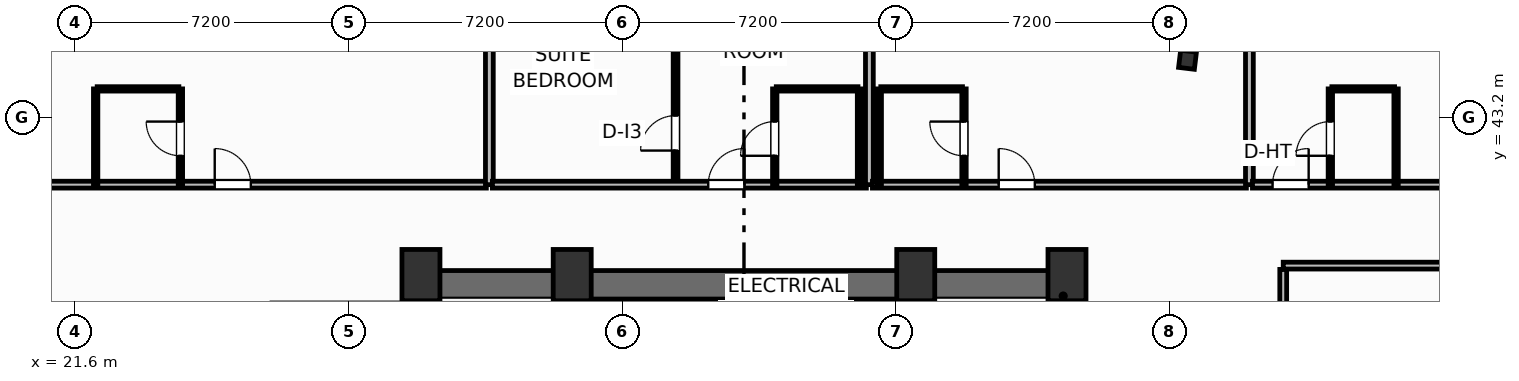
"""IFC4 building model, lengths in metres.
Left out: names, types, materials, properties, quantities, classifications, styles, units other than length and angle.
Written with IfcOpenShell. Run it as: python <this file> out.ifc"""

import sys

from ifc_helpers import new_model, si_unit, direction, frame, frame_2d, origin, origin_2d, place, context, subcontext, project, spatial, rectangle, i_section, extrude, element, fill, save


model = new_model("IFC4")
c1 = context("Model", 3, precision=1e-05, world=origin(), true_north=direction((0.0, 1.0)))
c2 = subcontext(c1, "Body", "Model", "MODEL_VIEW")
j1 = project(units=[si_unit("LENGTHUNIT", "METRE"), si_unit("PLANEANGLEUNIT", "RADIAN")], contexts=[c1])
p1 = place(None, origin())
s1 = spatial("IfcSite", under=j1, at=p1, CompositionType="ELEMENT")
p2 = place(p1, origin())
s2 = spatial("IfcBuilding", under=s1, at=p2, CompositionType="ELEMENT")
p3 = place(p2, frame((0.0, 0.0, 125.4)))
s3 = spatial("IfcBuildingStorey", under=s2, at=p3, CompositionType="ELEMENT", Elevation=125.4)
for number, where, z_axis, x_axis in (
    (1, (30.7, 39.05, 0.0), (0.0, 0.0, 1.0), (1.0, 0.0, 0.0)),
    (2, (34.68, 39.05, 0.0), (0.0, 0.0, 1.0), (1.0, 0.0, 0.0)),
    (3, (43.72, 39.05, 0.0), (0.0, 0.0, 1.0), (1.0, 0.0, 0.0)),
    (4, (47.7, 39.05, 0.0), (0.0, 0.0, 1.0), (1.0, 0.0, 0.0)),
):
    element("IfcColumn", number, at=place(p3, frame(where, z_axis=z_axis, x_axis=x_axis)), inside=s3, PredefinedType="COLUMN", context=c2, shape_type="SweptSolid", body=[
        extrude(rectangle(XDim=1.0, YDim=1.35, at=origin_2d()), origin(), (0.0, 0.0, 1.0), 3.7),
    ])
p4 = place(p3, frame((30.38, 38.795, 0.0), z_axis=(0.0, 0.0, 1.0), x_axis=(1.0, 0.0, 0.0)))
e5 = element("IfcWall", 5, at=p4, inside=s3, PredefinedType="SHEAR", context=c2, shape_type="SweptSolid", body=[
    extrude(rectangle(XDim=17.64, YDim=0.75, at=frame_2d((8.82, 0.0))), origin(), (0.0, 0.0, 1.0), 3.45),
])
for number, where, z_axis, x_axis in (
    (6, (30.755, 29.2, 0.0), (0.0, 0.0, 1.0), (0.0, 1.0, 0.0)),
    (7, (47.645, 29.2, 0.0), (0.0, 0.0, 1.0), (0.0, 1.0, 0.0)),
):
    element("IfcWall", number, at=place(p3, frame(where, z_axis=z_axis, x_axis=x_axis)), inside=s3, PredefinedType="SHEAR", context=c2, shape_type="SweptSolid", body=[
        extrude(rectangle(XDim=9.22, YDim=0.75, at=frame_2d((4.61, 0.0))), origin(), (0.0, 0.0, 1.0), 3.45),
    ])
p5 = place(p3, frame((34.64, 29.2, 0.0), z_axis=(0.0, 0.0, 1.0), x_axis=(0.0, 1.0, 0.0)))
e8 = element("IfcWall", 8, at=p5, inside=s3, PredefinedType="SHEAR", context=c2, shape_type="SweptSolid", body=[
    extrude(rectangle(XDim=9.22, YDim=0.25, at=frame_2d((4.61, 0.0))), origin(), (0.0, 0.0, 1.0), 3.45),
])
p6 = place(p5, frame((0.65, 0.0, 0.0)))
e9 = element("IfcOpeningElement", 9, at=p6, cuts=e8, PredefinedType="OPENING", context=c2, shape_type="SweptSolid", body=[
    extrude(rectangle(XDim=1.05, YDim=2.15, at=frame_2d((0.525, 1.075))), frame((0.0, 0.135, 0.0), z_axis=(0.0, -1.0, 0.0), x_axis=(1.0, 0.0, 0.0)), (0.0, 0.0, 1.0), 0.27),
])
p7 = place(p3, frame((43.76, 29.2, 0.0), z_axis=(0.0, 0.0, 1.0), x_axis=(0.0, 1.0, 0.0)))
e10 = element("IfcWall", 10, at=p7, inside=s3, PredefinedType="SHEAR", context=c2, shape_type="SweptSolid", body=[
    extrude(rectangle(XDim=9.22, YDim=0.25, at=frame_2d((4.61, 0.0))), origin(), (0.0, 0.0, 1.0), 3.45),
])
p8 = place(p7, frame((0.65, 0.0, 0.0)))
e11 = element("IfcOpeningElement", 11, at=p8, cuts=e10, PredefinedType="OPENING", context=c2, shape_type="SweptSolid", body=[
    extrude(rectangle(XDim=1.05, YDim=2.15, at=frame_2d((0.525, 1.075))), frame((0.0, 0.135, 0.0), z_axis=(0.0, -1.0, 0.0), x_axis=(1.0, 0.0, 0.0)), (0.0, 0.0, 1.0), 0.27),
])
p9 = place(p3, frame((50.872, 44.717, 0.0), z_axis=(0.0, 0.0, 1.0), x_axis=(0.992732158755, -0.12034475881, 0.0)))
e12 = element("IfcColumn", 12, at=p9, inside=s3, PredefinedType="COLUMN", context=c2, shape_type="SweptSolid", body=[
    extrude(i_section(OverallWidth=0.418, OverallDepth=0.455, WebThickness=0.042, FlangeThickness=0.068, FilletRadius=0.025, at=origin_2d()), origin(), (0.0, 0.0, 1.0), 3.7),
])
p10 = place(p3, frame((73.538, 44.588, 0.0), z_axis=(0.0, 0.0, 1.0), x_axis=(-0.992733493583, 0.120333747213, 0.0)))
e13 = element("IfcWall", 13, at=p10, inside=s3, PredefinedType="SOLIDWALL", context=c2, shape_type="SweptSolid", body=[
    extrude(rectangle(XDim=21.447, YDim=0.22, at=frame_2d((10.724, 0.0))), origin(), (0.0, 0.0, 1.0), 2.73),
])
p11 = place(p10, frame((9.899, 0.0, 0.8)))
e14 = element("IfcOpeningElement", 14, at=p11, cuts=e13, PredefinedType="OPENING", context=c2, shape_type="SweptSolid", body=[
    extrude(rectangle(XDim=1.65, YDim=1.65, at=frame_2d((0.825, 0.825))), frame((0.0, 0.12, 0.0), z_axis=(0.0, -1.0, 0.0), x_axis=(1.0, 0.0, 0.0)), (0.0, 0.0, 1.0), 0.24),
])
p12 = place(p3, frame((3.864, 41.43, 0.0), z_axis=(0.0, 0.0, 1.0), x_axis=(1.0, 0.0, 0.0)))
e15 = element("IfcWall", 15, at=p12, inside=s3, PredefinedType="PARTITIONING", context=c2, shape_type="SweptSolid", body=[
    extrude(rectangle(XDim=28.556, YDim=0.18, at=frame_2d((14.278, 0.0))), origin(), (0.0, 0.0, 1.0), 3.45),
])
p13 = place(p12, frame((21.409, 0.0, 0.0)))
e16 = element("IfcOpeningElement", 16, at=p13, cuts=e15, PredefinedType="OPENING", context=c2, shape_type="SweptSolid", body=[
    extrude(rectangle(XDim=0.95, YDim=2.15, at=frame_2d((0.475, 1.075))), frame((0.0, 0.1, 0.0), z_axis=(0.0, -1.0, 0.0), x_axis=(1.0, 0.0, 0.0)), (0.0, 0.0, 1.0), 0.2),
])
p14 = place(p3, frame((22.18, 43.95, 0.0), z_axis=(0.0, 0.0, 1.0), x_axis=(1.0, 0.0, 0.0)))
e17 = element("IfcWall", 17, at=p14, inside=s3, PredefinedType="PARTITIONING", context=c2, shape_type="SweptSolid", body=[
    extrude(rectangle(XDim=2.15, YDim=0.115, at=frame_2d((1.075, 0.0))), origin(), (0.0, 0.0, 1.0), 3.45),
])
p15 = place(p3, frame((24.37, 41.43, 0.0), z_axis=(0.0, 0.0, 1.0), x_axis=(0.0, 1.0, 0.0)))
e18 = element("IfcWall", 18, at=p15, inside=s3, PredefinedType="PARTITIONING", context=c2, shape_type="SweptSolid", body=[
    extrude(rectangle(XDim=2.52, YDim=0.115, at=frame_2d((1.26, 0.0))), origin(), (0.0, 0.0, 1.0), 3.45),
])
p16 = place(p15, frame((0.76, 0.0, 0.0)))
e19 = element("IfcOpeningElement", 19, at=p16, cuts=e18, PredefinedType="OPENING", context=c2, shape_type="SweptSolid", body=[
    extrude(rectangle(XDim=0.9, YDim=2.05, at=frame_2d((0.45, 1.025))), frame((0.0, 0.067, 0.0), z_axis=(0.0, -1.0, 0.0), x_axis=(1.0, 0.0, 0.0)), (0.0, 0.0, 1.0), 0.135),
])
p17 = place(p3, frame((22.14, 41.43, 0.0), z_axis=(0.0, 0.0, 1.0), x_axis=(0.0, 1.0, 0.0)))
e20 = element("IfcWall", 20, at=p17, inside=s3, PredefinedType="PARTITIONING", context=c2, shape_type="SweptSolid", body=[
    extrude(rectangle(XDim=2.52, YDim=0.115, at=frame_2d((1.26, 0.0))), origin(), (0.0, 0.0, 1.0), 3.45),
])
p18 = place(p3, frame((32.5, 41.43, 0.0), z_axis=(0.0, 0.0, 1.0), x_axis=(0.0, 1.0, 0.0)))
e21 = element("IfcWall", 21, at=p18, inside=s3, PredefinedType="PARTITIONING", context=c2, shape_type="SweptSolid", body=[
    extrude(rectangle(XDim=5.997, YDim=0.205, at=frame_2d((2.999, 0.0))), origin(), (0.0, 0.0, 1.0), 2.662),
])
p19 = place(p3, frame((37.4, 41.43, 0.0), z_axis=(0.0, 0.0, 1.0), x_axis=(0.0, 1.0, 0.0)))
e22 = element("IfcWall", 22, at=p19, inside=s3, PredefinedType="PARTITIONING", context=c2, shape_type="SweptSolid", body=[
    extrude(rectangle(XDim=5.403, YDim=0.125, at=frame_2d((2.702, 0.0))), origin(), (0.0, 0.0, 1.0), 3.45),
])
p20 = place(p19, frame((0.897, 0.0, 0.0)))
e23 = element("IfcOpeningElement", 23, at=p20, cuts=e22, PredefinedType="OPENING", context=c2, shape_type="SweptSolid", body=[
    extrude(rectangle(XDim=0.92, YDim=2.05, at=frame_2d((0.46, 1.025))), frame((0.0, 0.073, 0.0), z_axis=(0.0, -1.0, 0.0), x_axis=(1.0, 0.0, 0.0)), (0.0, 0.0, 1.0), 0.145),
])
p21 = place(p3, frame((32.58, 41.43, 0.0), z_axis=(0.0, 0.0, 1.0), x_axis=(1.0, 0.0, 0.0)))
e24 = element("IfcWall", 24, at=p21, inside=s3, PredefinedType="PARTITIONING", context=c2, shape_type="SweptSolid", body=[
    extrude(rectangle(XDim=9.84, YDim=0.18, at=frame_2d((4.92, 0.0))), origin(), (0.0, 0.0, 1.0), 3.45),
])
p22 = place(p21, frame((5.68, 0.0, 0.0)))
e25 = element("IfcOpeningElement", 25, at=p22, cuts=e24, PredefinedType="OPENING", context=c2, shape_type="SweptSolid", body=[
    extrude(rectangle(XDim=0.95, YDim=2.15, at=frame_2d((0.475, 1.075))), frame((0.0, 0.1, 0.0), z_axis=(0.0, -1.0, 0.0), x_axis=(1.0, 0.0, 0.0)), (0.0, 0.0, 1.0), 0.2),
])
p23 = place(p3, frame((40.05, 43.95, 0.0), z_axis=(0.0, 0.0, 1.0), x_axis=(1.0, 0.0, 0.0)))
e26 = element("IfcWall", 26, at=p23, inside=s3, PredefinedType="PARTITIONING", context=c2, shape_type="SweptSolid", body=[
    extrude(rectangle(XDim=2.15, YDim=0.115, at=frame_2d((1.075, 0.0))), origin(), (0.0, 0.0, 1.0), 3.45),
])
p24 = place(p3, frame((40.01, 41.43, 0.0), z_axis=(0.0, 0.0, 1.0), x_axis=(0.0, 1.0, 0.0)))
e27 = element("IfcWall", 27, at=p24, inside=s3, PredefinedType="PARTITIONING", context=c2, shape_type="SweptSolid", body=[
    extrude(rectangle(XDim=2.52, YDim=0.115, at=frame_2d((1.26, 0.0))), origin(), (0.0, 0.0, 1.0), 3.45),
])
p25 = place(p24, frame((0.76, 0.0, 0.0)))
e28 = element("IfcOpeningElement", 28, at=p25, cuts=e27, PredefinedType="OPENING", context=c2, shape_type="SweptSolid", body=[
    extrude(rectangle(XDim=0.9, YDim=2.05, at=frame_2d((0.45, 1.025))), frame((0.0, 0.067, 0.0), z_axis=(0.0, -1.0, 0.0), x_axis=(1.0, 0.0, 0.0)), (0.0, 0.0, 1.0), 0.135),
])
p26 = place(p3, frame((42.24, 41.43, 0.0), z_axis=(0.0, 0.0, 1.0), x_axis=(0.0, 1.0, 0.0)))
e29 = element("IfcWall", 29, at=p26, inside=s3, PredefinedType="PARTITIONING", context=c2, shape_type="SweptSolid", body=[
    extrude(rectangle(XDim=2.52, YDim=0.115, at=frame_2d((1.26, 0.0))), origin(), (0.0, 0.0, 1.0), 2.662),
])
p27 = place(p3, frame((42.5, 41.43, 0.0), z_axis=(0.0, 0.0, 1.0), x_axis=(0.0, 1.0, 0.0)))
e30 = element("IfcWall", 30, at=p27, inside=s3, PredefinedType="PARTITIONING", context=c2, shape_type="SweptSolid", body=[
    extrude(rectangle(XDim=6.9, YDim=0.205, at=frame_2d((3.45, 0.0))), origin(), (0.0, 0.0, 1.0), 2.662),
])
p28 = place(p3, frame((42.58, 41.43, 0.0), z_axis=(0.0, 0.0, 1.0), x_axis=(1.0, 0.0, 0.0)))
e31 = element("IfcWall", 31, at=p28, inside=s3, PredefinedType="PARTITIONING", context=c2, shape_type="SweptSolid", body=[
    extrude(rectangle(XDim=9.84, YDim=0.18, at=frame_2d((4.92, 0.0))), origin(), (0.0, 0.0, 1.0), 3.45),
])
p29 = place(p28, frame((3.323, 0.0, 0.0)))
e32 = element("IfcOpeningElement", 32, at=p29, cuts=e31, PredefinedType="OPENING", context=c2, shape_type="SweptSolid", body=[
    extrude(rectangle(XDim=0.95, YDim=2.15, at=frame_2d((0.475, 1.075))), frame((0.0, 0.1, 0.0), z_axis=(0.0, -1.0, 0.0), x_axis=(1.0, 0.0, 0.0)), (0.0, 0.0, 1.0), 0.2),
])
p30 = place(p3, frame((42.8, 43.95, 0.0), z_axis=(0.0, 0.0, 1.0), x_axis=(1.0, 0.0, 0.0)))
e33 = element("IfcWall", 33, at=p30, inside=s3, PredefinedType="PARTITIONING", context=c2, shape_type="SweptSolid", body=[
    extrude(rectangle(XDim=2.15, YDim=0.115, at=frame_2d((1.075, 0.0))), origin(), (0.0, 0.0, 1.0), 3.45),
])
p31 = place(p3, frame((44.99, 41.43, 0.0), z_axis=(0.0, 0.0, 1.0), x_axis=(0.0, 1.0, 0.0)))
e34 = element("IfcWall", 34, at=p31, inside=s3, PredefinedType="PARTITIONING", context=c2, shape_type="SweptSolid", body=[
    extrude(rectangle(XDim=2.52, YDim=0.115, at=frame_2d((1.26, 0.0))), origin(), (0.0, 0.0, 1.0), 3.45),
])
p32 = place(p31, frame((0.76, 0.0, 0.0)))
e35 = element("IfcOpeningElement", 35, at=p32, cuts=e34, PredefinedType="OPENING", context=c2, shape_type="SweptSolid", body=[
    extrude(rectangle(XDim=0.9, YDim=2.05, at=frame_2d((0.45, 1.025))), frame((0.0, 0.067, 0.0), z_axis=(0.0, -1.0, 0.0), x_axis=(1.0, 0.0, 0.0)), (0.0, 0.0, 1.0), 0.135),
])
p33 = place(p3, frame((42.76, 41.43, 0.0), z_axis=(0.0, 0.0, 1.0), x_axis=(0.0, 1.0, 0.0)))
e36 = element("IfcWall", 36, at=p33, inside=s3, PredefinedType="PARTITIONING", context=c2, shape_type="SweptSolid", body=[
    extrude(rectangle(XDim=2.52, YDim=0.115, at=frame_2d((1.26, 0.0))), origin(), (0.0, 0.0, 1.0), 2.662),
])
p34 = place(p3, frame((52.5, 41.43, 0.0), z_axis=(0.0, 0.0, 1.0), x_axis=(0.0, 1.0, 0.0)))
e37 = element("IfcWall", 37, at=p34, inside=s3, PredefinedType="PARTITIONING", context=c2, shape_type="SweptSolid", body=[
    extrude(rectangle(XDim=5.688, YDim=0.205, at=frame_2d((2.844, 0.0))), origin(), (0.0, 0.0, 1.0), 3.45),
])
p35 = place(p3, frame((52.58, 41.43, 0.0), z_axis=(0.0, 0.0, 1.0), x_axis=(1.0, 0.0, 0.0)))
e38 = element("IfcWall", 38, at=p35, inside=s3, PredefinedType="PARTITIONING", context=c2, shape_type="SweptSolid", body=[
    extrude(rectangle(XDim=21.74, YDim=0.18, at=frame_2d((10.87, 0.0))), origin(), (0.0, 0.0, 1.0), 3.45),
])
p36 = place(p35, frame((0.529, 0.0, 0.0)))
e39 = element("IfcOpeningElement", 39, at=p36, cuts=e38, PredefinedType="OPENING", context=c2, shape_type="SweptSolid", body=[
    extrude(rectangle(XDim=0.95, YDim=2.15, at=frame_2d((0.475, 1.075))), frame((0.0, 0.1, 0.0), z_axis=(0.0, -1.0, 0.0), x_axis=(1.0, 0.0, 0.0)), (0.0, 0.0, 1.0), 0.2),
])
p37 = place(p3, frame((54.67, 43.95, 0.0), z_axis=(0.0, 0.0, 1.0), x_axis=(1.0, 0.0, 0.0)))
e40 = element("IfcWall", 40, at=p37, inside=s3, PredefinedType="PARTITIONING", context=c2, shape_type="SweptSolid", body=[
    extrude(rectangle(XDim=1.65, YDim=0.115, at=frame_2d((0.825, 0.0))), origin(), (0.0, 0.0, 1.0), 2.824),
])
p38 = place(p3, frame((54.63, 41.43, 0.0), z_axis=(0.0, 0.0, 1.0), x_axis=(0.0, 1.0, 0.0)))
e41 = element("IfcWall", 41, at=p38, inside=s3, PredefinedType="PARTITIONING", context=c2, shape_type="SweptSolid", body=[
    extrude(rectangle(XDim=2.52, YDim=0.115, at=frame_2d((1.26, 0.0))), origin(), (0.0, 0.0, 1.0), 3.45),
])
p39 = place(p38, frame((0.76, 0.0, 0.0)))
e42 = element("IfcOpeningElement", 42, at=p39, cuts=e41, PredefinedType="OPENING", context=c2, shape_type="SweptSolid", body=[
    extrude(rectangle(XDim=0.9, YDim=2.05, at=frame_2d((0.45, 1.025))), frame((0.0, 0.067, 0.0), z_axis=(0.0, -1.0, 0.0), x_axis=(1.0, 0.0, 0.0)), (0.0, 0.0, 1.0), 0.135),
])
p40 = place(p3, frame((56.36, 41.43, 0.0), z_axis=(0.0, 0.0, 1.0), x_axis=(0.0, 1.0, 0.0)))
e43 = element("IfcWall", 43, at=p40, inside=s3, PredefinedType="PARTITIONING", context=c2, shape_type="SweptSolid", body=[
    extrude(rectangle(XDim=2.52, YDim=0.115, at=frame_2d((1.26, 0.0))), origin(), (0.0, 0.0, 1.0), 3.45),
])
p41 = place(p3, frame((53.39, 27.53, 0.0), z_axis=(0.0, 0.0, 1.0), x_axis=(0.0, 1.0, 0.0)))
e44 = element("IfcWall", 44, at=p41, inside=s3, PredefinedType="PARTITIONING", context=c2, shape_type="SweptSolid", body=[
    extrude(rectangle(XDim=11.67, YDim=0.18, at=frame_2d((5.835, 0.0))), origin(), (0.0, 0.0, 1.0), 3.45),
])
p42 = place(p41, frame((5.8, 0.0, 0.0)))
e45 = element("IfcOpeningElement", 45, at=p42, cuts=e44, PredefinedType="OPENING", context=c2, shape_type="SweptSolid", body=[
    extrude(rectangle(XDim=0.92, YDim=2.05, at=frame_2d((0.46, 1.025))), frame((0.0, 0.1, 0.0), z_axis=(0.0, -1.0, 0.0), x_axis=(1.0, 0.0, 0.0)), (0.0, 0.0, 1.0), 0.2),
])
p43 = place(p3, frame((53.39, 39.3, 0.0), z_axis=(0.0, 0.0, 1.0), x_axis=(1.0, 0.0, 0.0)))
e46 = element("IfcWall", 46, at=p43, inside=s3, PredefinedType="PARTITIONING", context=c2, shape_type="SweptSolid", body=[
    extrude(rectangle(XDim=24.74, YDim=0.18, at=frame_2d((12.37, 0.0))), origin(), (0.0, 0.0, 1.0), 3.45),
])
p44 = place(p13, origin())
e47 = element("IfcDoor", 47, at=p44, inside=s3, OperationType="SINGLE_SWING_LEFT", PredefinedType="DOOR", context=c2, shape_type="SweptSolid", body=[
    extrude(rectangle(XDim=0.95, YDim=2.15, at=frame_2d((0.475, 1.075))), frame((0.0, 0.025, 0.0), z_axis=(0.0, -1.0, 0.0), x_axis=(1.0, 0.0, 0.0)), (0.0, 0.0, 1.0), 0.05),
])
fill(e16, e47)
p45 = place(p16, origin())
e48 = element("IfcDoor", 48, at=p45, inside=s3, OperationType="SINGLE_SWING_RIGHT", PredefinedType="DOOR", context=c2, shape_type="SweptSolid", body=[
    extrude(rectangle(XDim=0.9, YDim=2.05, at=frame_2d((0.45, 1.025))), frame((0.0, 0.025, 0.0), z_axis=(0.0, -1.0, 0.0), x_axis=(1.0, 0.0, 0.0)), (0.0, 0.0, 1.0), 0.05),
])
fill(e19, e48)
p46 = place(p20, origin())
e49 = element("IfcDoor", 49, at=p46, inside=s3, OperationType="SINGLE_SWING_LEFT", PredefinedType="DOOR", context=c2, shape_type="SweptSolid", body=[
    extrude(rectangle(XDim=0.92, YDim=2.05, at=frame_2d((0.46, 1.025))), frame((0.0, 0.025, 0.0), z_axis=(0.0, -1.0, 0.0), x_axis=(1.0, 0.0, 0.0)), (0.0, 0.0, 1.0), 0.05),
])
fill(e23, e49)
p47 = place(p22, origin())
e50 = element("IfcDoor", 50, at=p47, inside=s3, OperationType="SINGLE_SWING_RIGHT", PredefinedType="DOOR", context=c2, shape_type="SweptSolid", body=[
    extrude(rectangle(XDim=0.95, YDim=2.15, at=frame_2d((0.475, 1.075))), frame((0.0, 0.025, 0.0), z_axis=(0.0, -1.0, 0.0), x_axis=(1.0, 0.0, 0.0)), (0.0, 0.0, 1.0), 0.05),
])
fill(e25, e50)
p48 = place(p25, origin())
e51 = element("IfcDoor", 51, at=p48, inside=s3, OperationType="SINGLE_SWING_LEFT", PredefinedType="DOOR", context=c2, shape_type="SweptSolid", body=[
    extrude(rectangle(XDim=0.9, YDim=2.05, at=frame_2d((0.45, 1.025))), frame((0.0, 0.025, 0.0), z_axis=(0.0, -1.0, 0.0), x_axis=(1.0, 0.0, 0.0)), (0.0, 0.0, 1.0), 0.05),
])
fill(e28, e51)
p49 = place(p29, origin())
e52 = element("IfcDoor", 52, at=p49, inside=s3, OperationType="SINGLE_SWING_LEFT", PredefinedType="DOOR", context=c2, shape_type="SweptSolid", body=[
    extrude(rectangle(XDim=0.95, YDim=2.15, at=frame_2d((0.475, 1.075))), frame((0.0, 0.025, 0.0), z_axis=(0.0, -1.0, 0.0), x_axis=(1.0, 0.0, 0.0)), (0.0, 0.0, 1.0), 0.05),
])
fill(e32, e52)
p50 = place(p32, origin())
e53 = element("IfcDoor", 53, at=p50, inside=s3, OperationType="SINGLE_SWING_RIGHT", PredefinedType="DOOR", context=c2, shape_type="SweptSolid", body=[
    extrude(rectangle(XDim=0.9, YDim=2.05, at=frame_2d((0.45, 1.025))), frame((0.0, 0.025, 0.0), z_axis=(0.0, -1.0, 0.0), x_axis=(1.0, 0.0, 0.0)), (0.0, 0.0, 1.0), 0.05),
])
fill(e35, e53)
p51 = place(p36, origin())
e54 = element("IfcDoor", 54, at=p51, inside=s3, OperationType="SINGLE_SWING_RIGHT", PredefinedType="DOOR", context=c2, shape_type="SweptSolid", body=[
    extrude(rectangle(XDim=0.95, YDim=2.15, at=frame_2d((0.475, 1.075))), frame((0.0, 0.025, 0.0), z_axis=(0.0, -1.0, 0.0), x_axis=(1.0, 0.0, 0.0)), (0.0, 0.0, 1.0), 0.05),
])
fill(e39, e54)
p52 = place(p39, origin())
e55 = element("IfcDoor", 55, at=p52, inside=s3, OperationType="SINGLE_SWING_LEFT", PredefinedType="DOOR", context=c2, shape_type="SweptSolid", body=[
    extrude(rectangle(XDim=0.9, YDim=2.05, at=frame_2d((0.45, 1.025))), frame((0.0, 0.025, 0.0), z_axis=(0.0, -1.0, 0.0), x_axis=(1.0, 0.0, 0.0)), (0.0, 0.0, 1.0), 0.05),
])
fill(e42, e55)
save(model, sys.argv[1])
